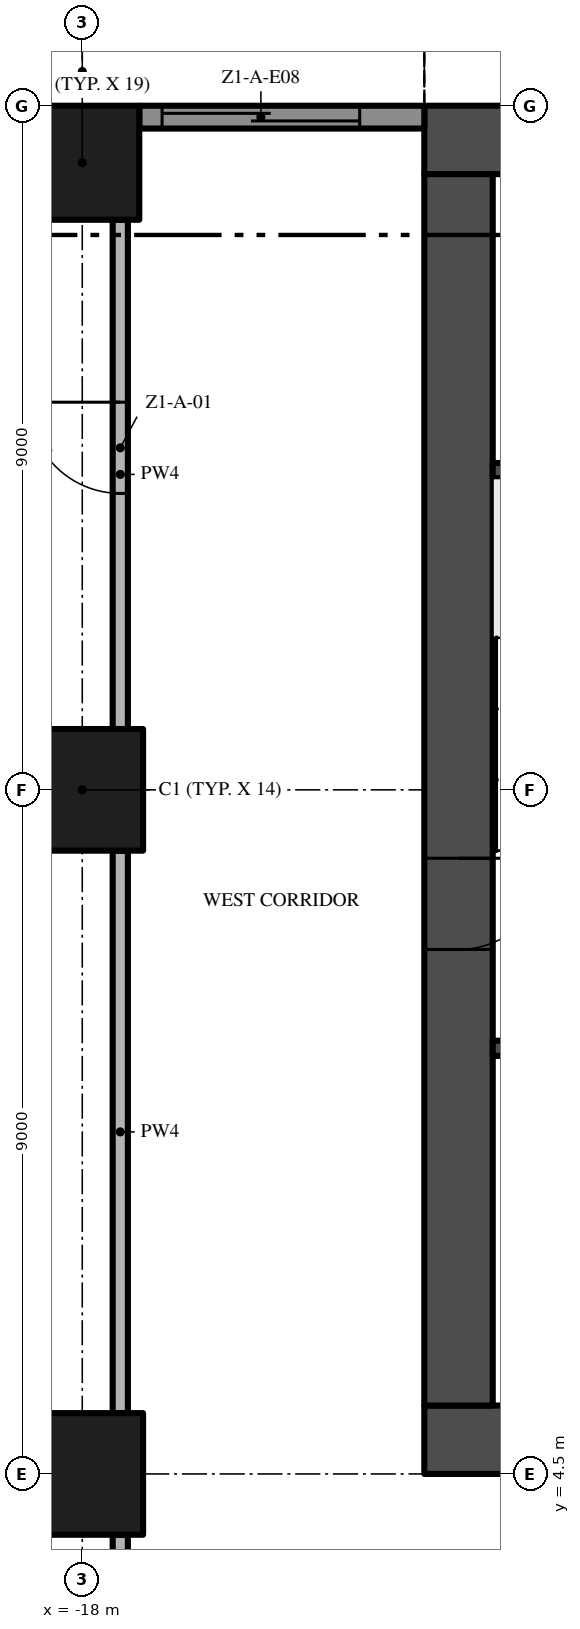
"""IFC4 building model, lengths in metres.
Left out: names, types, materials, properties, quantities, classifications, styles, units other than length and angle.
Written with IfcOpenShell. Run it as: python <this file> out.ifc"""

import sys

from ifc_helpers import new_model, si_unit, direction, frame, frame_2d, origin, origin_2d, place, context, subcontext, project, spatial, rectangle, extrude, element, fill, save


model = new_model("IFC4")
c1 = context("Model", 3, precision=1e-05, world=origin(), true_north=direction((0.0, 1.0)))
c2 = subcontext(c1, "Body", "Model", "MODEL_VIEW")
j1 = project(units=[si_unit("LENGTHUNIT", "METRE"), si_unit("PLANEANGLEUNIT", "RADIAN")], contexts=[c1])
p1 = place(None, origin())
s1 = spatial("IfcSite", under=j1, at=p1, CompositionType="ELEMENT")
p2 = place(p1, origin())
s2 = spatial("IfcBuilding", under=s1, at=p2, CompositionType="ELEMENT")
p3 = place(p2, frame((0.0, 0.0, 15.0)))
s3 = spatial("IfcBuildingStorey", under=s2, at=p3, CompositionType="ELEMENT", Elevation=15.0)
p4 = place(p3, frame((-13.5, 4.95, -0.3), z_axis=(0.0, 0.0, 1.0), x_axis=(1.0, 0.0, 0.0)))
e1 = element("IfcWall", 1, at=p4, inside=s3, PredefinedType="SHEAR", context=c2, shape_type="SweptSolid", body=[
    extrude(rectangle(XDim=27.0, YDim=0.9, at=frame_2d((13.5, 0.0))), origin(), (0.0, 0.0, 1.0), 3.8),
])
p5 = place(p4, frame((12.0, 0.0, 0.3)))
e2 = element("IfcOpeningElement", 2, at=p5, cuts=e1, PredefinedType="OPENING", context=c2, shape_type="SweptSolid", body=[
    extrude(rectangle(XDim=3.0, YDim=2.4, at=frame_2d((1.5, 1.2))), frame((0.0, 0.46, 0.0), z_axis=(0.0, -1.0, 0.0), x_axis=(1.0, 0.0, 0.0)), (0.0, 0.0, 1.0), 0.92),
])
p6 = place(p4, frame((4.9, 0.0, 0.3)))
e3 = element("IfcOpeningElement", 3, at=p6, cuts=e1, PredefinedType="OPENING", context=c2, shape_type="SweptSolid", body=[
    extrude(rectangle(XDim=1.2, YDim=2.2, at=frame_2d((0.6, 1.1))), frame((0.0, 0.46, 0.0), z_axis=(0.0, -1.0, 0.0), x_axis=(1.0, 0.0, 0.0)), (0.0, 0.0, 1.0), 0.92),
])
p7 = place(p4, frame((20.75, 0.0, 0.3)))
e4 = element("IfcOpeningElement", 4, at=p7, cuts=e1, PredefinedType="OPENING", context=c2, shape_type="SweptSolid", body=[
    extrude(rectangle(XDim=1.5, YDim=2.2, at=frame_2d((0.75, 1.1))), frame((0.0, 0.46, 0.0), z_axis=(0.0, -1.0, 0.0), x_axis=(1.0, 0.0, 0.0)), (0.0, 0.0, 1.0), 0.92),
])
p8 = place(p4, frame((17.4, 0.0, 0.3)))
e5 = element("IfcOpeningElement", 5, at=p8, cuts=e1, PredefinedType="OPENING", context=c2, shape_type="SweptSolid", body=[
    extrude(rectangle(XDim=1.2, YDim=2.2, at=frame_2d((0.6, 1.1))), frame((0.0, 0.46, 0.0), z_axis=(0.0, -1.0, 0.0), x_axis=(1.0, 0.0, 0.0)), (0.0, 0.0, 1.0), 0.92),
])
p9 = place(p3, frame((13.5, 22.05, -0.3), z_axis=(0.0, 0.0, 1.0), x_axis=(-1.0, 0.0, 0.0)))
e6 = element("IfcWall", 6, at=p9, inside=s3, PredefinedType="SHEAR", context=c2, shape_type="SweptSolid", body=[
    extrude(rectangle(XDim=27.0, YDim=0.9, at=frame_2d((13.5, 0.0))), origin(), (0.0, 0.0, 1.0), 3.8),
])
p10 = place(p3, frame((-13.05, 21.6, -0.3), z_axis=(0.0, 0.0, 1.0), x_axis=(0.0, -1.0, 0.0)))
e7 = element("IfcWall", 7, at=p10, inside=s3, PredefinedType="SHEAR", context=c2, shape_type="SweptSolid", body=[
    extrude(rectangle(XDim=16.2, YDim=0.9, at=frame_2d((8.1, 0.0))), origin(), (0.0, 0.0, 1.0), 3.8),
])
p11 = place(p10, frame((9.0, 0.0, 0.3)))
e8 = element("IfcOpeningElement", 8, at=p11, cuts=e7, PredefinedType="OPENING", context=c2, shape_type="SweptSolid", body=[
    extrude(rectangle(XDim=1.2, YDim=2.2, at=frame_2d((0.6, 1.1))), frame((0.0, 0.46, 0.0), z_axis=(0.0, -1.0, 0.0), x_axis=(1.0, 0.0, 0.0)), (0.0, 0.0, 1.0), 0.92),
])
p12 = place(p3, frame((-18.0, 13.5, 0.0), z_axis=(0.0, 0.0, 1.0), x_axis=(1.0, 0.0, 0.0)))
e9 = element("IfcColumn", 9, at=p12, inside=s3, PredefinedType="COLUMN", context=c2, shape_type="SweptSolid", body=[
    extrude(rectangle(XDim=1.6, YDim=1.6, at=origin_2d()), origin(), (0.0, 0.0, 1.0), 3.5),
])
p13 = place(p3, frame((-18.0, 21.75, 0.0), z_axis=(0.0, 0.0, 1.0), x_axis=(1.0, 0.0, 0.0)))
e10 = element("IfcColumn", 10, at=p13, inside=s3, PredefinedType="COLUMN", context=c2, shape_type="SweptSolid", body=[
    extrude(rectangle(XDim=1.5, YDim=1.5, at=origin_2d()), origin(), (0.0, 0.0, 1.0), 3.5),
])
p14 = place(p3, frame((-18.0, 4.5, 0.0), z_axis=(0.0, 0.0, 1.0), x_axis=(1.0, 0.0, 0.0)))
e11 = element("IfcColumn", 11, at=p14, inside=s3, PredefinedType="COLUMN", context=c2, shape_type="SweptSolid", body=[
    extrude(rectangle(XDim=1.6, YDim=1.6, at=origin_2d()), origin(), (0.0, 0.0, 1.0), 3.5),
])
p15 = place(p3, frame((-17.25, 22.35, 0.0), z_axis=(0.0, 0.0, 1.0), x_axis=(1.0, 0.0, 0.0)))
e12 = element("IfcWall", 12, at=p15, inside=s3, PredefinedType="SOLIDWALL", context=c2, shape_type="SweptSolid", body=[
    extrude(rectangle(XDim=3.75, YDim=0.3, at=frame_2d((1.875, 0.0))), origin(), (0.0, 0.0, 1.0), 3.5),
])
p16 = place(p15, frame((0.3, 0.0, 0.0)))
e13 = element("IfcOpeningElement", 13, at=p16, cuts=e12, PredefinedType="OPENING", context=c2, shape_type="SweptSolid", body=[
    extrude(rectangle(XDim=2.6, YDim=2.4, at=frame_2d((1.3, 1.2))), frame((0.0, 0.16, 0.0), z_axis=(0.0, -1.0, 0.0), x_axis=(1.0, 0.0, 0.0)), (0.0, 0.0, 1.0), 0.32),
])
for number, where, z_axis, x_axis in (
    (14, (-12.6, 10.1, 0.0), (0.0, 0.0, 1.0), (1.0, 0.0, 0.0)),
    (15, (-12.6, 17.7, 0.0), (0.0, 0.0, 1.0), (1.0, 0.0, 0.0)),
):
    element("IfcWall", number, at=place(p3, frame(where, z_axis=z_axis, x_axis=x_axis)), inside=s3, PredefinedType="SHEAR", context=c2, shape_type="SweptSolid", body=[
        extrude(rectangle(XDim=2.95, YDim=0.2, at=frame_2d((1.475, 0.0))), origin(), (0.0, 0.0, 1.0), 3.5),
    ])
p17 = place(p3, frame((-17.5, -0.2, 0.0), z_axis=(0.0, 0.0, 1.0), x_axis=(0.0, 1.0, 0.0)))
e16 = element("IfcWall", 16, at=p17, inside=s3, PredefinedType="PARTITIONING", context=c2, shape_type="SweptSolid", body=[
    extrude(rectangle(XDim=3.9, YDim=0.2, at=frame_2d((1.95, 0.0))), origin(), (0.0, 0.0, 1.0), 3.5),
])
p18 = place(p3, frame((-17.5, 5.3, 0.0), z_axis=(0.0, 0.0, 1.0), x_axis=(0.0, 1.0, 0.0)))
e17 = element("IfcWall", 17, at=p18, inside=s3, PredefinedType="PARTITIONING", context=c2, shape_type="SweptSolid", body=[
    extrude(rectangle(XDim=7.4, YDim=0.2, at=frame_2d((3.7, 0.0))), origin(), (0.0, 0.0, 1.0), 3.5),
])
p19 = place(p3, frame((-17.5, 14.3, 0.0), z_axis=(0.0, 0.0, 1.0), x_axis=(0.0, 1.0, 0.0)))
e18 = element("IfcWall", 18, at=p19, inside=s3, PredefinedType="PARTITIONING", context=c2, shape_type="SweptSolid", body=[
    extrude(rectangle(XDim=6.7, YDim=0.2, at=frame_2d((3.35, 0.0))), origin(), (0.0, 0.0, 1.0), 3.5),
])
p20 = place(p19, frame((3.1, 0.0, 0.0)))
e19 = element("IfcOpeningElement", 19, at=p20, cuts=e18, PredefinedType="OPENING", context=c2, shape_type="SweptSolid", body=[
    extrude(rectangle(XDim=1.2, YDim=2.4, at=frame_2d((0.6, 1.2))), frame((0.0, 0.11, 0.0), z_axis=(0.0, -1.0, 0.0), x_axis=(1.0, 0.0, 0.0)), (0.0, 0.0, 1.0), 0.22),
])
p21 = place(p16, origin())
e20 = element("IfcDoor", 20, at=p21, inside=s3, OperationType="SINGLE_SWING_LEFT", PredefinedType="DOOR", context=c2, shape_type="SweptSolid", body=[
    extrude(rectangle(XDim=2.6, YDim=2.4, at=frame_2d((1.3, 1.2))), frame((0.0, 0.025, 0.0), z_axis=(0.0, -1.0, 0.0), x_axis=(1.0, 0.0, 0.0)), (0.0, 0.0, 1.0), 0.05),
])
fill(e13, e20)
p22 = place(p11, frame((1.2, 0.0, 0.0), z_axis=(0.0, 0.0, 1.0), x_axis=(-1.0, 0.0, 0.0)))
e21 = element("IfcDoor", 21, at=p22, inside=s3, OperationType="SINGLE_SWING_RIGHT", PredefinedType="DOOR", context=c2, shape_type="SweptSolid", body=[
    extrude(rectangle(XDim=1.2, YDim=2.2, at=frame_2d((0.6, 1.1))), frame((0.0, 0.025, 0.0), z_axis=(0.0, -1.0, 0.0), x_axis=(1.0, 0.0, 0.0)), (0.0, 0.0, 1.0), 0.05),
])
fill(e8, e21)
p23 = place(p20, origin())
e22 = element("IfcDoor", 22, at=p23, inside=s3, OperationType="SINGLE_SWING_RIGHT", PredefinedType="DOOR", context=c2, shape_type="SweptSolid", body=[
    extrude(rectangle(XDim=1.2, YDim=2.4, at=frame_2d((0.6, 1.2))), frame((0.0, 0.025, 0.0), z_axis=(0.0, -1.0, 0.0), x_axis=(1.0, 0.0, 0.0)), (0.0, 0.0, 1.0), 0.05),
])
fill(e19, e22)
save(model, sys.argv[1])
